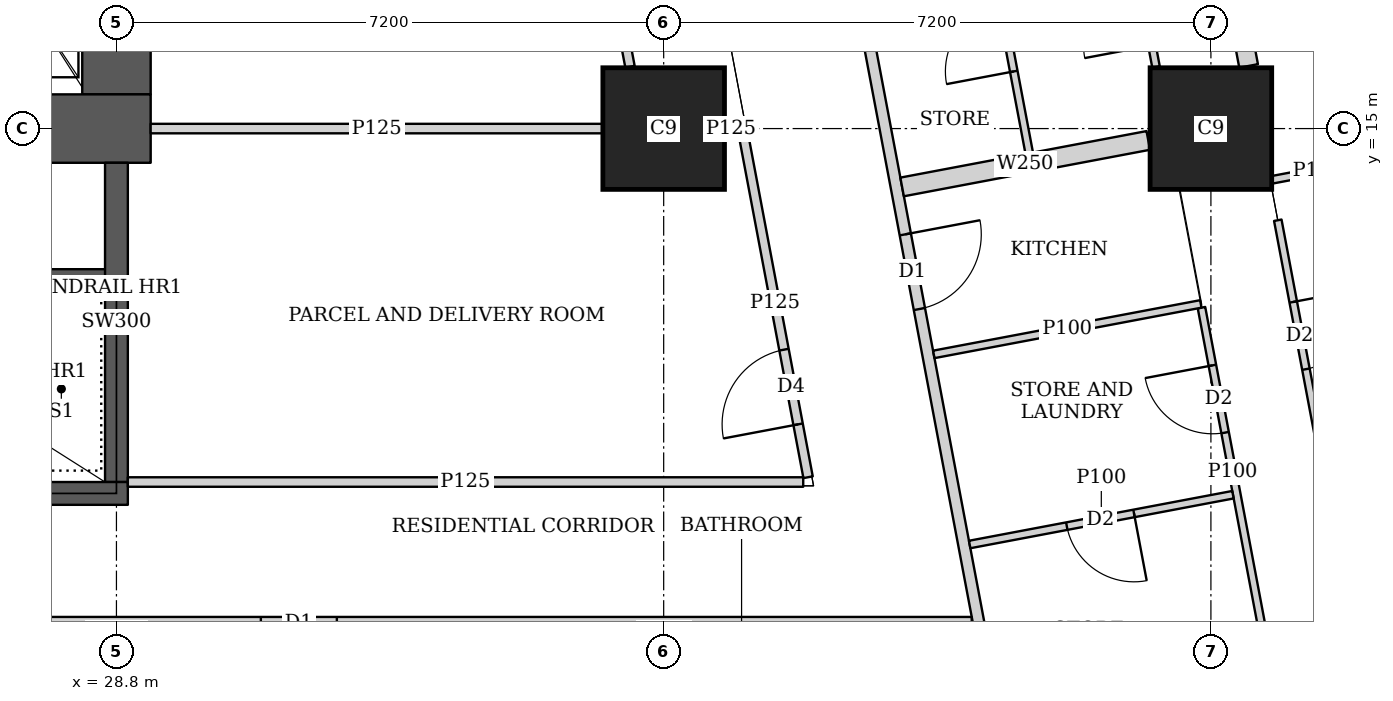
"""IFC4 building model, lengths in metres.
Left out: names, types, materials, properties, quantities, classifications, styles, units other than length and angle.
Written with IfcOpenShell. Run it as: python <this file> out.ifc"""

import sys

from ifc_helpers import new_model, si_unit, direction, frame, frame_2d, origin, origin_2d, place, context, subcontext, project, spatial, rectangle, extrude, element, fill, save


model = new_model("IFC4")
c1 = context("Model", 3, precision=1e-05, world=origin(), true_north=direction((0.0, 1.0)))
c2 = subcontext(c1, "Body", "Model", "MODEL_VIEW")
j1 = project(units=[si_unit("LENGTHUNIT", "METRE"), si_unit("PLANEANGLEUNIT", "RADIAN")], contexts=[c1])
p1 = place(None, origin())
s1 = spatial("IfcSite", under=j1, at=p1, CompositionType="ELEMENT")
p2 = place(p1, origin())
s2 = spatial("IfcBuilding", under=s1, at=p2, CompositionType="ELEMENT")
p3 = place(p2, frame((0.0, 0.0, 111.65)))
s3 = spatial("IfcBuildingStorey", under=s2, at=p3, CompositionType="ELEMENT", Elevation=111.65)
for number, where, z_axis, x_axis in (
    (1, (36.0, 15.0, 0.0), (0.0, 0.0, 1.0), (1.0, 0.0, 0.0)),
    (2, (43.2, 15.0, 0.0), (0.0, 0.0, 1.0), (1.0, 0.0, 0.0)),
):
    element("IfcColumn", number, at=place(p3, frame(where, z_axis=z_axis, x_axis=x_axis)), inside=s3, PredefinedType="COLUMN", context=c2, shape_type="SweptSolid", body=[
        extrude(rectangle(XDim=1.6, YDim=1.6, at=origin_2d()), origin(), (0.0, 0.0, 1.0), 3.75),
    ])
p4 = place(p3, frame((13.95, 15.0, 0.0), z_axis=(0.0, 0.0, 1.0), x_axis=(1.0, 0.0, 0.0)))
e3 = element("IfcWall", 3, at=p4, inside=s3, PredefinedType="SHEAR", context=c2, shape_type="SweptSolid", body=[
    extrude(rectangle(XDim=15.3, YDim=0.9, at=frame_2d((7.65, 0.0))), origin(), (0.0, 0.0, 1.0), 3.75),
])
p5 = place(p4, frame((4.45, 0.0, 0.0)))
e4 = element("IfcOpeningElement", 4, at=p5, cuts=e3, PredefinedType="OPENING", context=c2, shape_type="SweptSolid", body=[
    extrude(rectangle(XDim=1.8, YDim=2.1, at=frame_2d((0.9, 1.05))), frame((0.0, 0.46, 0.0), z_axis=(0.0, -1.0, 0.0), x_axis=(1.0, 0.0, 0.0)), (0.0, 0.0, 1.0), 0.92),
])
p6 = place(p4, frame((10.7, 0.0, 0.0)))
e5 = element("IfcOpeningElement", 5, at=p6, cuts=e3, PredefinedType="OPENING", context=c2, shape_type="SweptSolid", body=[
    extrude(rectangle(XDim=1.1, YDim=2.1, at=frame_2d((0.55, 1.05))), frame((0.0, 0.46, 0.0), z_axis=(0.0, -1.0, 0.0), x_axis=(1.0, 0.0, 0.0)), (0.0, 0.0, 1.0), 0.92),
])
p7 = place(p3, frame((28.8, 15.45, 0.0), z_axis=(0.0, 0.0, 1.0), x_axis=(0.0, 1.0, 0.0)))
e6 = element("IfcWall", 6, at=p7, inside=s3, PredefinedType="SHEAR", context=c2, shape_type="SweptSolid", body=[
    extrude(rectangle(XDim=14.1, YDim=0.9, at=frame_2d((7.05, 0.0))), origin(), (0.0, 0.0, 1.0), 3.75),
])
p8 = place(p3, frame((21.45, 10.2, 0.0), z_axis=(0.0, 0.0, 1.0), x_axis=(1.0, 0.0, 0.0)))
e7 = element("IfcWall", 7, at=p8, inside=s3, PredefinedType="SHEAR", context=c2, shape_type="SweptSolid", body=[
    extrude(rectangle(XDim=7.5, YDim=0.3, at=frame_2d((3.75, 0.0))), origin(), (0.0, 0.0, 1.0), 3.75),
])
p9 = place(p8, frame((0.5, 0.0, 0.0)))
e8 = element("IfcOpeningElement", 8, at=p9, cuts=e7, PredefinedType="OPENING", context=c2, shape_type="SweptSolid", body=[
    extrude(rectangle(XDim=1.1, YDim=2.1, at=frame_2d((0.55, 1.05))), frame((0.0, 0.16, 0.0), z_axis=(0.0, -1.0, 0.0), x_axis=(1.0, 0.0, 0.0)), (0.0, 0.0, 1.0), 0.32),
])
p10 = place(p3, frame((28.8, 10.35, 0.0), z_axis=(0.0, 0.0, 1.0), x_axis=(0.0, 1.0, 0.0)))
e9 = element("IfcWall", 9, at=p10, inside=s3, PredefinedType="SHEAR", context=c2, shape_type="SweptSolid", body=[
    extrude(rectangle(XDim=4.2, YDim=0.3, at=frame_2d((2.1, 0.0))), origin(), (0.0, 0.0, 1.0), 3.75),
])
p11 = place(p3, frame((50.653, 2.703, 0.0), z_axis=(0.0, 0.0, 1.0), x_axis=(-0.185612026696, 0.982623109613, 0.0)))
e10 = element("IfcWall", 10, at=p11, inside=s3, PredefinedType="SOLIDWALL", context=c2, shape_type="SweptSolid", body=[
    extrude(rectangle(XDim=41.393, YDim=0.2, at=frame_2d((20.697, 0.0))), origin(), (0.0, 0.0, 1.0), 3.5),
])
p12 = place(p11, frame((1.633, 0.0, 0.9)))
e11 = element("IfcOpeningElement", 11, at=p12, cuts=e10, PredefinedType="OPENING", context=c2, shape_type="SweptSolid", body=[
    extrude(rectangle(XDim=1.8, YDim=1.5, at=frame_2d((0.9, 0.75))), frame((0.0, 0.11, 0.0), z_axis=(0.0, -1.0, 0.0), x_axis=(1.0, 0.0, 0.0)), (0.0, 0.0, 1.0), 0.22),
])
p13 = place(p11, frame((6.032, 0.0, 0.9)))
e12 = element("IfcOpeningElement", 12, at=p13, cuts=e10, PredefinedType="OPENING", context=c2, shape_type="SweptSolid", body=[
    extrude(rectangle(XDim=1.8, YDim=1.5, at=frame_2d((0.9, 0.75))), frame((0.0, 0.11, 0.0), z_axis=(0.0, -1.0, 0.0), x_axis=(1.0, 0.0, 0.0)), (0.0, 0.0, 1.0), 0.22),
])
p14 = place(p11, frame((9.848, 0.0, 0.9)))
e13 = element("IfcOpeningElement", 13, at=p14, cuts=e10, PredefinedType="OPENING", context=c2, shape_type="SweptSolid", body=[
    extrude(rectangle(XDim=1.8, YDim=1.5, at=frame_2d((0.9, 0.75))), frame((0.0, 0.11, 0.0), z_axis=(0.0, -1.0, 0.0), x_axis=(1.0, 0.0, 0.0)), (0.0, 0.0, 1.0), 0.22),
])
p15 = place(p11, frame((13.664, 0.0, 0.9)))
e14 = element("IfcOpeningElement", 14, at=p15, cuts=e10, PredefinedType="OPENING", context=c2, shape_type="SweptSolid", body=[
    extrude(rectangle(XDim=1.8, YDim=1.5, at=frame_2d((0.9, 0.75))), frame((0.0, 0.11, 0.0), z_axis=(0.0, -1.0, 0.0), x_axis=(1.0, 0.0, 0.0)), (0.0, 0.0, 1.0), 0.22),
])
p16 = place(p11, frame((17.481, 0.0, 0.9)))
e15 = element("IfcOpeningElement", 15, at=p16, cuts=e10, PredefinedType="OPENING", context=c2, shape_type="SweptSolid", body=[
    extrude(rectangle(XDim=1.8, YDim=1.5, at=frame_2d((0.9, 0.75))), frame((0.0, 0.11, 0.0), z_axis=(0.0, -1.0, 0.0), x_axis=(1.0, 0.0, 0.0)), (0.0, 0.0, 1.0), 0.22),
])
p17 = place(p11, frame((21.297, 0.0, 0.9)))
e16 = element("IfcOpeningElement", 16, at=p17, cuts=e10, PredefinedType="OPENING", context=c2, shape_type="SweptSolid", body=[
    extrude(rectangle(XDim=1.8, YDim=1.5, at=frame_2d((0.9, 0.75))), frame((0.0, 0.11, 0.0), z_axis=(0.0, -1.0, 0.0), x_axis=(1.0, 0.0, 0.0)), (0.0, 0.0, 1.0), 0.22),
])
p18 = place(p11, frame((25.113, 0.0, 0.9)))
e17 = element("IfcOpeningElement", 17, at=p18, cuts=e10, PredefinedType="OPENING", context=c2, shape_type="SweptSolid", body=[
    extrude(rectangle(XDim=1.8, YDim=1.5, at=frame_2d((0.9, 0.75))), frame((0.0, 0.11, 0.0), z_axis=(0.0, -1.0, 0.0), x_axis=(1.0, 0.0, 0.0)), (0.0, 0.0, 1.0), 0.22),
])
p19 = place(p11, frame((28.93, 0.0, 0.9)))
e18 = element("IfcOpeningElement", 18, at=p19, cuts=e10, PredefinedType="OPENING", context=c2, shape_type="SweptSolid", body=[
    extrude(rectangle(XDim=1.8, YDim=1.5, at=frame_2d((0.9, 0.75))), frame((0.0, 0.11, 0.0), z_axis=(0.0, -1.0, 0.0), x_axis=(1.0, 0.0, 0.0)), (0.0, 0.0, 1.0), 0.22),
])
p20 = place(p11, frame((32.746, 0.0, 0.9)))
e19 = element("IfcOpeningElement", 19, at=p20, cuts=e10, PredefinedType="OPENING", context=c2, shape_type="SweptSolid", body=[
    extrude(rectangle(XDim=1.8, YDim=1.5, at=frame_2d((0.9, 0.75))), frame((0.0, 0.11, 0.0), z_axis=(0.0, -1.0, 0.0), x_axis=(1.0, 0.0, 0.0)), (0.0, 0.0, 1.0), 0.22),
])
p21 = place(p11, frame((36.481, 0.0, 0.9)))
e20 = element("IfcOpeningElement", 20, at=p21, cuts=e10, PredefinedType="OPENING", context=c2, shape_type="SweptSolid", body=[
    extrude(rectangle(XDim=1.8, YDim=1.5, at=frame_2d((0.9, 0.75))), frame((0.0, 0.11, 0.0), z_axis=(0.0, -1.0, 0.0), x_axis=(1.0, 0.0, 0.0)), (0.0, 0.0, 1.0), 0.22),
])
p22 = place(p3, frame((40.053, 8.5, 0.0), z_axis=(0.0, 0.0, 1.0), x_axis=(-1.0, 0.0, 0.0)))
e21 = element("IfcWall", 21, at=p22, inside=s3, PredefinedType="SOLIDWALL", context=c2, shape_type="SweptSolid", body=[
    extrude(rectangle(XDim=31.703, YDim=0.15, at=frame_2d((15.852, 0.0))), origin(), (0.0, 0.0, 1.0), 3.5),
])
p23 = place(p22, frame((28.103, 0.0, 0.0)))
e22 = element("IfcOpeningElement", 22, at=p23, cuts=e21, PredefinedType="OPENING", context=c2, shape_type="SweptSolid", body=[
    extrude(rectangle(XDim=1.0, YDim=2.1, at=frame_2d((0.5, 1.05))), frame((0.0, 0.085, 0.0), z_axis=(0.0, -1.0, 0.0), x_axis=(1.0, 0.0, 0.0)), (0.0, 0.0, 1.0), 0.17),
])
p24 = place(p22, frame((19.754, 0.0, 0.0)))
e23 = element("IfcOpeningElement", 23, at=p24, cuts=e21, PredefinedType="OPENING", context=c2, shape_type="SweptSolid", body=[
    extrude(rectangle(XDim=1.0, YDim=2.1, at=frame_2d((0.5, 1.05))), frame((0.0, 0.085, 0.0), z_axis=(0.0, -1.0, 0.0), x_axis=(1.0, 0.0, 0.0)), (0.0, 0.0, 1.0), 0.17),
])
p25 = place(p22, frame((8.353, 0.0, 0.0)))
e24 = element("IfcOpeningElement", 24, at=p25, cuts=e21, PredefinedType="OPENING", context=c2, shape_type="SweptSolid", body=[
    extrude(rectangle(XDim=1.0, YDim=2.1, at=frame_2d((0.5, 1.05))), frame((0.0, 0.085, 0.0), z_axis=(0.0, -1.0, 0.0), x_axis=(1.0, 0.0, 0.0)), (0.0, 0.0, 1.0), 0.17),
])
p26 = place(p3, frame((33.127, 45.65, 0.0), z_axis=(0.0, 0.0, 1.0), x_axis=(0.185598547723, -0.98262565562, 0.0)))
e25 = element("IfcWall", 25, at=p26, inside=s3, PredefinedType="SOLIDWALL", context=c2, shape_type="SweptSolid", body=[
    extrude(rectangle(XDim=47.118, YDim=0.15, at=frame_2d((23.559, 0.0))), origin(), (0.0, 0.0, 1.0), 2.2),
])
p27 = place(p26, frame((20.373, 0.0, 0.0)))
e26 = element("IfcOpeningElement", 26, at=p27, cuts=e25, PredefinedType="OPENING", context=c2, shape_type="SweptSolid", body=[
    extrude(rectangle(XDim=1.0, YDim=2.1, at=frame_2d((0.5, 1.05))), frame((0.0, 0.085, 0.0), z_axis=(0.0, -1.0, 0.0), x_axis=(1.0, 0.0, 0.0)), (0.0, 0.0, 1.0), 0.17),
])
p28 = place(p26, frame((24.188, 0.0, 0.0)))
e27 = element("IfcOpeningElement", 27, at=p28, cuts=e25, PredefinedType="OPENING", context=c2, shape_type="SweptSolid", body=[
    extrude(rectangle(XDim=1.0, YDim=2.1, at=frame_2d((0.5, 1.05))), frame((0.0, 0.085, 0.0), z_axis=(0.0, -1.0, 0.0), x_axis=(1.0, 0.0, 0.0)), (0.0, 0.0, 1.0), 0.17),
])
p29 = place(p26, frame((32.608, 0.0, 0.0)))
e28 = element("IfcOpeningElement", 28, at=p29, cuts=e25, PredefinedType="OPENING", context=c2, shape_type="SweptSolid", body=[
    extrude(rectangle(XDim=1.0, YDim=2.1, at=frame_2d((0.5, 1.05))), frame((0.0, 0.085, 0.0), z_axis=(0.0, -1.0, 0.0), x_axis=(1.0, 0.0, 0.0)), (0.0, 0.0, 1.0), 0.17),
])
p30 = place(p3, frame((41.65, 20.193, 0.0), z_axis=(0.0, 0.0, 1.0), x_axis=(0.18565316258, -0.982615338382, 0.0)))
e29 = element("IfcWall", 29, at=p30, inside=s3, PredefinedType="PARTITIONING", context=c2, shape_type="SweptSolid", body=[
    extrude(rectangle(XDim=4.461, YDim=0.1, at=frame_2d((2.23, 0.0))), origin(), (0.0, 0.0, 1.0), 3.5),
])
p31 = place(p30, frame((0.575, 0.0, 0.0)))
e30 = element("IfcOpeningElement", 30, at=p31, cuts=e29, PredefinedType="OPENING", context=c2, shape_type="SweptSolid", body=[
    extrude(rectangle(XDim=0.9, YDim=2.1, at=frame_2d((0.45, 1.05))), frame((0.0, 0.06, 0.0), z_axis=(0.0, -1.0, 0.0), x_axis=(1.0, 0.0, 0.0)), (0.0, 0.0, 1.0), 0.12),
])
p32 = place(p30, frame((3.271, 0.0, 0.0)))
e31 = element("IfcOpeningElement", 31, at=p32, cuts=e29, PredefinedType="OPENING", context=c2, shape_type="SweptSolid", body=[
    extrude(rectangle(XDim=0.9, YDim=2.1, at=frame_2d((0.45, 1.05))), frame((0.0, 0.06, 0.0), z_axis=(0.0, -1.0, 0.0), x_axis=(1.0, 0.0, 0.0)), (0.0, 0.0, 1.0), 0.12),
])
p33 = place(p3, frame((44.08, 13.794, 0.0), z_axis=(0.0, 0.0, 1.0), x_axis=(0.185608455357, -0.982623784212, 0.0)))
e32 = element("IfcWall", 32, at=p33, inside=s3, PredefinedType="PARTITIONING", context=c2, shape_type="SweptSolid", body=[
    extrude(rectangle(XDim=10.909, YDim=0.1, at=frame_2d((5.455, 0.0))), origin(), (0.0, 0.0, 1.0), 3.5),
])
p34 = place(p33, frame((1.094, 0.0, 0.0)))
e33 = element("IfcOpeningElement", 33, at=p34, cuts=e32, PredefinedType="OPENING", context=c2, shape_type="SweptSolid", body=[
    extrude(rectangle(XDim=0.9, YDim=2.1, at=frame_2d((0.45, 1.05))), frame((0.0, 0.06, 0.0), z_axis=(0.0, -1.0, 0.0), x_axis=(1.0, 0.0, 0.0)), (0.0, 0.0, 1.0), 0.12),
])
p35 = place(p33, frame((3.639, 0.0, 0.0)))
e34 = element("IfcOpeningElement", 34, at=p35, cuts=e32, PredefinedType="OPENING", context=c2, shape_type="SweptSolid", body=[
    extrude(rectangle(XDim=0.9, YDim=2.1, at=frame_2d((0.45, 1.05))), frame((0.0, 0.06, 0.0), z_axis=(0.0, -1.0, 0.0), x_axis=(1.0, 0.0, 0.0)), (0.0, 0.0, 1.0), 0.12),
])
p36 = place(p33, frame((8.05, 0.0, 0.0)))
e35 = element("IfcOpeningElement", 35, at=p36, cuts=e32, PredefinedType="OPENING", context=c2, shape_type="SweptSolid", body=[
    extrude(rectangle(XDim=0.9, YDim=2.1, at=frame_2d((0.45, 1.05))), frame((0.0, 0.06, 0.0), z_axis=(0.0, -1.0, 0.0), x_axis=(1.0, 0.0, 0.0)), (0.0, 0.0, 1.0), 0.12),
])
p37 = place(p3, frame((43.076, 12.644, 0.0), z_axis=(0.0, 0.0, 1.0), x_axis=(0.185705350074, -0.982605476757, 0.0)))
e36 = element("IfcWall", 36, at=p37, inside=s3, PredefinedType="PARTITIONING", context=c2, shape_type="SweptSolid", body=[
    extrude(rectangle(XDim=4.411, YDim=0.1, at=frame_2d((2.205, 0.0))), origin(), (0.0, 0.0, 1.0), 3.5),
])
p38 = place(p37, frame((0.773, 0.0, 0.0)))
e37 = element("IfcOpeningElement", 37, at=p38, cuts=e36, PredefinedType="OPENING", context=c2, shape_type="SweptSolid", body=[
    extrude(rectangle(XDim=0.9, YDim=2.1, at=frame_2d((0.45, 1.05))), frame((0.0, 0.06, 0.0), z_axis=(0.0, -1.0, 0.0), x_axis=(1.0, 0.0, 0.0)), (0.0, 0.0, 1.0), 0.12),
])
p39 = place(p3, frame((45.204, 14.553, 0.0), z_axis=(0.0, 0.0, 1.0), x_axis=(-0.982545444659, -0.186022711461, 0.0)))
e38 = element("IfcWall", 38, at=p39, inside=s3, PredefinedType="PARTITIONING", context=c2, shape_type="SweptSolid", body=[
    extrude(rectangle(XDim=1.215, YDim=0.1, at=frame_2d((0.608, 0.0))), origin(), (0.0, 0.0, 1.0), 3.5),
])
p40 = place(p3, frame((43.067, 12.693, 0.0), z_axis=(0.0, 0.0, 1.0), x_axis=(-0.982598214409, -0.185743772548, 0.0)))
e39 = element("IfcWall", 39, at=p40, inside=s3, PredefinedType="PARTITIONING", context=c2, shape_type="SweptSolid", body=[
    extrude(rectangle(XDim=3.575, YDim=0.1, at=frame_2d((1.788, 0.0))), origin(), (0.0, 0.0, 1.0), 3.5),
])
p41 = place(p3, frame((43.49, 10.183, 0.0), z_axis=(0.0, 0.0, 1.0), x_axis=(-0.982588017646, -0.185797706064, 0.0)))
e40 = element("IfcWall", 40, at=p41, inside=s3, PredefinedType="PARTITIONING", context=c2, shape_type="SweptSolid", body=[
    extrude(rectangle(XDim=3.525, YDim=0.1, at=frame_2d((1.763, 0.0))), origin(), (0.0, 0.0, 1.0), 3.5),
])
p42 = place(p41, frame((1.325, 0.0, 0.0)))
e41 = element("IfcOpeningElement", 41, at=p42, cuts=e40, PredefinedType="OPENING", context=c2, shape_type="SweptSolid", body=[
    extrude(rectangle(XDim=0.9, YDim=2.1, at=frame_2d((0.45, 1.05))), frame((0.0, 0.06, 0.0), z_axis=(0.0, -1.0, 0.0), x_axis=(1.0, 0.0, 0.0)), (0.0, 0.0, 1.0), 0.12),
])
p43 = place(p3, frame((42.376, 14.844, 0.0), z_axis=(0.0, 0.0, 1.0), x_axis=(-0.982610440948, -0.18567908159, 0.0)))
e42 = element("IfcWall", 42, at=p43, inside=s3, PredefinedType="SOLIDWALL", context=c2, shape_type="SweptSolid", body=[
    extrude(rectangle(XDim=3.296, YDim=0.25, at=frame_2d((1.648, 0.0))), origin(), (0.0, 0.0, 1.0), 3.5),
])
p44 = place(p3, frame((43.325, 17.792, 0.0), z_axis=(0.0, 0.0, 1.0), x_axis=(0.185296805985, -0.982682600686, 0.0)))
e43 = element("IfcWall", 43, at=p44, inside=s3, PredefinedType="SOLIDWALL", context=c2, shape_type="SweptSolid", body=[
    extrude(rectangle(XDim=2.003, YDim=0.25, at=frame_2d((1.001, 0.0))), origin(), (0.0, 0.0, 1.0), 3.5),
])
p45 = place(p3, frame((40.222, 17.786, 0.0), z_axis=(0.0, 0.0, 1.0), x_axis=(0.185768925106, -0.982593459405, 0.0)))
e44 = element("IfcWall", 44, at=p45, inside=s3, PredefinedType="PARTITIONING", context=c2, shape_type="SweptSolid", body=[
    extrude(rectangle(XDim=3.166, YDim=0.1, at=frame_2d((1.583, 0.0))), origin(), (0.0, 0.0, 1.0), 3.5),
])
p46 = place(p45, frame((1.17, 0.0, 0.0)))
e45 = element("IfcOpeningElement", 45, at=p46, cuts=e44, PredefinedType="OPENING", context=c2, shape_type="SweptSolid", body=[
    extrude(rectangle(XDim=0.9, YDim=2.1, at=frame_2d((0.45, 1.05))), frame((0.0, 0.06, 0.0), z_axis=(0.0, -1.0, 0.0), x_axis=(1.0, 0.0, 0.0)), (0.0, 0.0, 1.0), 0.12),
])
p47 = place(p3, frame((28.95, 10.35, 0.0), z_axis=(0.0, 0.0, 1.0), x_axis=(1.0, 0.0, 0.0)))
e46 = element("IfcWall", 46, at=p47, inside=s3, PredefinedType="PARTITIONING", context=c2, shape_type="SweptSolid", body=[
    extrude(rectangle(XDim=8.886, YDim=0.125, at=frame_2d((4.443, 0.0))), origin(), (0.0, 0.0, 1.0), 3.5),
])
p48 = place(p3, frame((37.9, 10.413, 0.0), z_axis=(0.0, 0.0, 1.0), x_axis=(-0.185513629891, 0.982641691119, 0.0)))
e47 = element("IfcWall", 47, at=p48, inside=s3, PredefinedType="PARTITIONING", context=c2, shape_type="SweptSolid", body=[
    extrude(rectangle(XDim=4.668, YDim=0.125, at=frame_2d((2.334, 0.0))), origin(), (0.0, 0.0, 1.0), 3.5),
])
p49 = place(p48, frame((0.708, 0.0, 0.0)))
e48 = element("IfcOpeningElement", 48, at=p49, cuts=e47, PredefinedType="OPENING", context=c2, shape_type="SweptSolid", body=[
    extrude(rectangle(XDim=1.0, YDim=2.1, at=frame_2d((0.5, 1.05))), frame((0.0, 0.073, 0.0), z_axis=(0.0, -1.0, 0.0), x_axis=(1.0, 0.0, 0.0)), (0.0, 0.0, 1.0), 0.145),
])
p50 = place(p3, frame((35.557, 15.813, 0.0), z_axis=(0.0, 0.0, 1.0), x_axis=(-0.185583681679, 0.982628463405, 0.0)))
e49 = element("IfcWall", 49, at=p50, inside=s3, PredefinedType="PARTITIONING", context=c2, shape_type="SweptSolid", body=[
    extrude(rectangle(XDim=13.61, YDim=0.125, at=frame_2d((6.805, 0.0))), origin(), (0.0, 0.0, 1.0), 2.5),
])
p51 = place(p50, frame((5.1, 0.0, 0.0)))
e50 = element("IfcOpeningElement", 50, at=p51, cuts=e49, PredefinedType="OPENING", context=c2, shape_type="SweptSolid", body=[
    extrude(rectangle(XDim=1.0, YDim=2.1, at=frame_2d((0.5, 1.05))), frame((0.0, 0.073, 0.0), z_axis=(0.0, -1.0, 0.0), x_axis=(1.0, 0.0, 0.0)), (0.0, 0.0, 1.0), 0.145),
])
p52 = place(p3, frame((29.25, 15.0, 0.0), z_axis=(0.0, 0.0, 1.0), x_axis=(1.0, 0.0, 0.0)))
e51 = element("IfcWall", 51, at=p52, inside=s3, PredefinedType="PARTITIONING", context=c2, shape_type="SweptSolid", body=[
    extrude(rectangle(XDim=5.949, YDim=0.125, at=frame_2d((2.975, 0.0))), origin(), (0.0, 0.0, 1.0), 3.5),
])
p53 = place(p3, frame((36.801, 15.0, 0.0), z_axis=(0.0, 0.0, 1.0), x_axis=(1.0, 0.0, 0.0)))
e52 = element("IfcWall", 52, at=p53, inside=s3, PredefinedType="PARTITIONING", context=c2, shape_type="SweptSolid", body=[
    extrude(rectangle(XDim=0.172, YDim=0.125, at=frame_2d((0.086, 0.0))), origin(), (0.0, 0.0, 1.0), 3.5),
])
p54 = place(p3, frame((23.0, 13.05, 0.0), z_axis=(0.0, 0.0, 1.0), x_axis=(1.0, 0.0, 0.0)))
e53 = element("IfcWall", 53, at=p54, inside=s3, PredefinedType="SHEAR", context=c2, shape_type="SweptSolid", body=[
    extrude(rectangle(XDim=5.8, YDim=0.2, at=frame_2d((2.9, 0.0))), origin(), (0.0, 0.0, 1.0), 3.75),
])
p55 = place(p25, origin())
e54 = element("IfcDoor", 54, at=p55, inside=s3, OperationType="SINGLE_SWING_RIGHT", PredefinedType="DOOR", context=c2, shape_type="SweptSolid", body=[
    extrude(rectangle(XDim=1.0, YDim=2.1, at=frame_2d((0.5, 1.05))), frame((0.0, 0.025, 0.0), z_axis=(0.0, -1.0, 0.0), x_axis=(1.0, 0.0, 0.0)), (0.0, 0.0, 1.0), 0.05),
])
fill(e24, e54)
p56 = place(p34, origin())
e55 = element("IfcDoor", 55, at=p56, inside=s3, OperationType="SINGLE_SWING_LEFT", PredefinedType="DOOR", context=c2, shape_type="SweptSolid", body=[
    extrude(rectangle(XDim=0.9, YDim=2.1, at=frame_2d((0.45, 1.05))), frame((0.0, 0.025, 0.0), z_axis=(0.0, -1.0, 0.0), x_axis=(1.0, 0.0, 0.0)), (0.0, 0.0, 1.0), 0.05),
])
fill(e33, e55)
p57 = place(p38, origin())
e56 = element("IfcDoor", 56, at=p57, inside=s3, OperationType="SINGLE_SWING_RIGHT", PredefinedType="DOOR", context=c2, shape_type="SweptSolid", body=[
    extrude(rectangle(XDim=0.9, YDim=2.1, at=frame_2d((0.45, 1.05))), frame((0.0, 0.025, 0.0), z_axis=(0.0, -1.0, 0.0), x_axis=(1.0, 0.0, 0.0)), (0.0, 0.0, 1.0), 0.05),
])
fill(e37, e56)
p58 = place(p29, origin())
e57 = element("IfcDoor", 57, at=p58, inside=s3, OperationType="SINGLE_SWING_LEFT", PredefinedType="DOOR", context=c2, shape_type="SweptSolid", body=[
    extrude(rectangle(XDim=1.0, YDim=2.1, at=frame_2d((0.5, 1.05))), frame((0.0, 0.025, 0.0), z_axis=(0.0, -1.0, 0.0), x_axis=(1.0, 0.0, 0.0)), (0.0, 0.0, 1.0), 0.05),
])
fill(e28, e57)
p59 = place(p42, origin())
e58 = element("IfcDoor", 58, at=p59, inside=s3, OperationType="SINGLE_SWING_LEFT", PredefinedType="DOOR", context=c2, shape_type="SweptSolid", body=[
    extrude(rectangle(XDim=0.9, YDim=2.1, at=frame_2d((0.45, 1.05))), frame((0.0, 0.025, 0.0), z_axis=(0.0, -1.0, 0.0), x_axis=(1.0, 0.0, 0.0)), (0.0, 0.0, 1.0), 0.05),
])
fill(e41, e58)
p60 = place(p46, origin())
e59 = element("IfcDoor", 59, at=p60, inside=s3, OperationType="SINGLE_SWING_LEFT", PredefinedType="DOOR", context=c2, shape_type="SweptSolid", body=[
    extrude(rectangle(XDim=0.9, YDim=2.1, at=frame_2d((0.45, 1.05))), frame((0.0, 0.025, 0.0), z_axis=(0.0, -1.0, 0.0), x_axis=(1.0, 0.0, 0.0)), (0.0, 0.0, 1.0), 0.05),
])
fill(e45, e59)
p61 = place(p49, origin())
e60 = element("IfcDoor", 60, at=p61, inside=s3, OperationType="SINGLE_SWING_LEFT", PredefinedType="DOOR", context=c2, shape_type="SweptSolid", body=[
    extrude(rectangle(XDim=1.0, YDim=2.1, at=frame_2d((0.5, 1.05))), frame((0.0, 0.025, 0.0), z_axis=(0.0, -1.0, 0.0), x_axis=(1.0, 0.0, 0.0)), (0.0, 0.0, 1.0), 0.05),
])
fill(e48, e60)
save(model, sys.argv[1])
